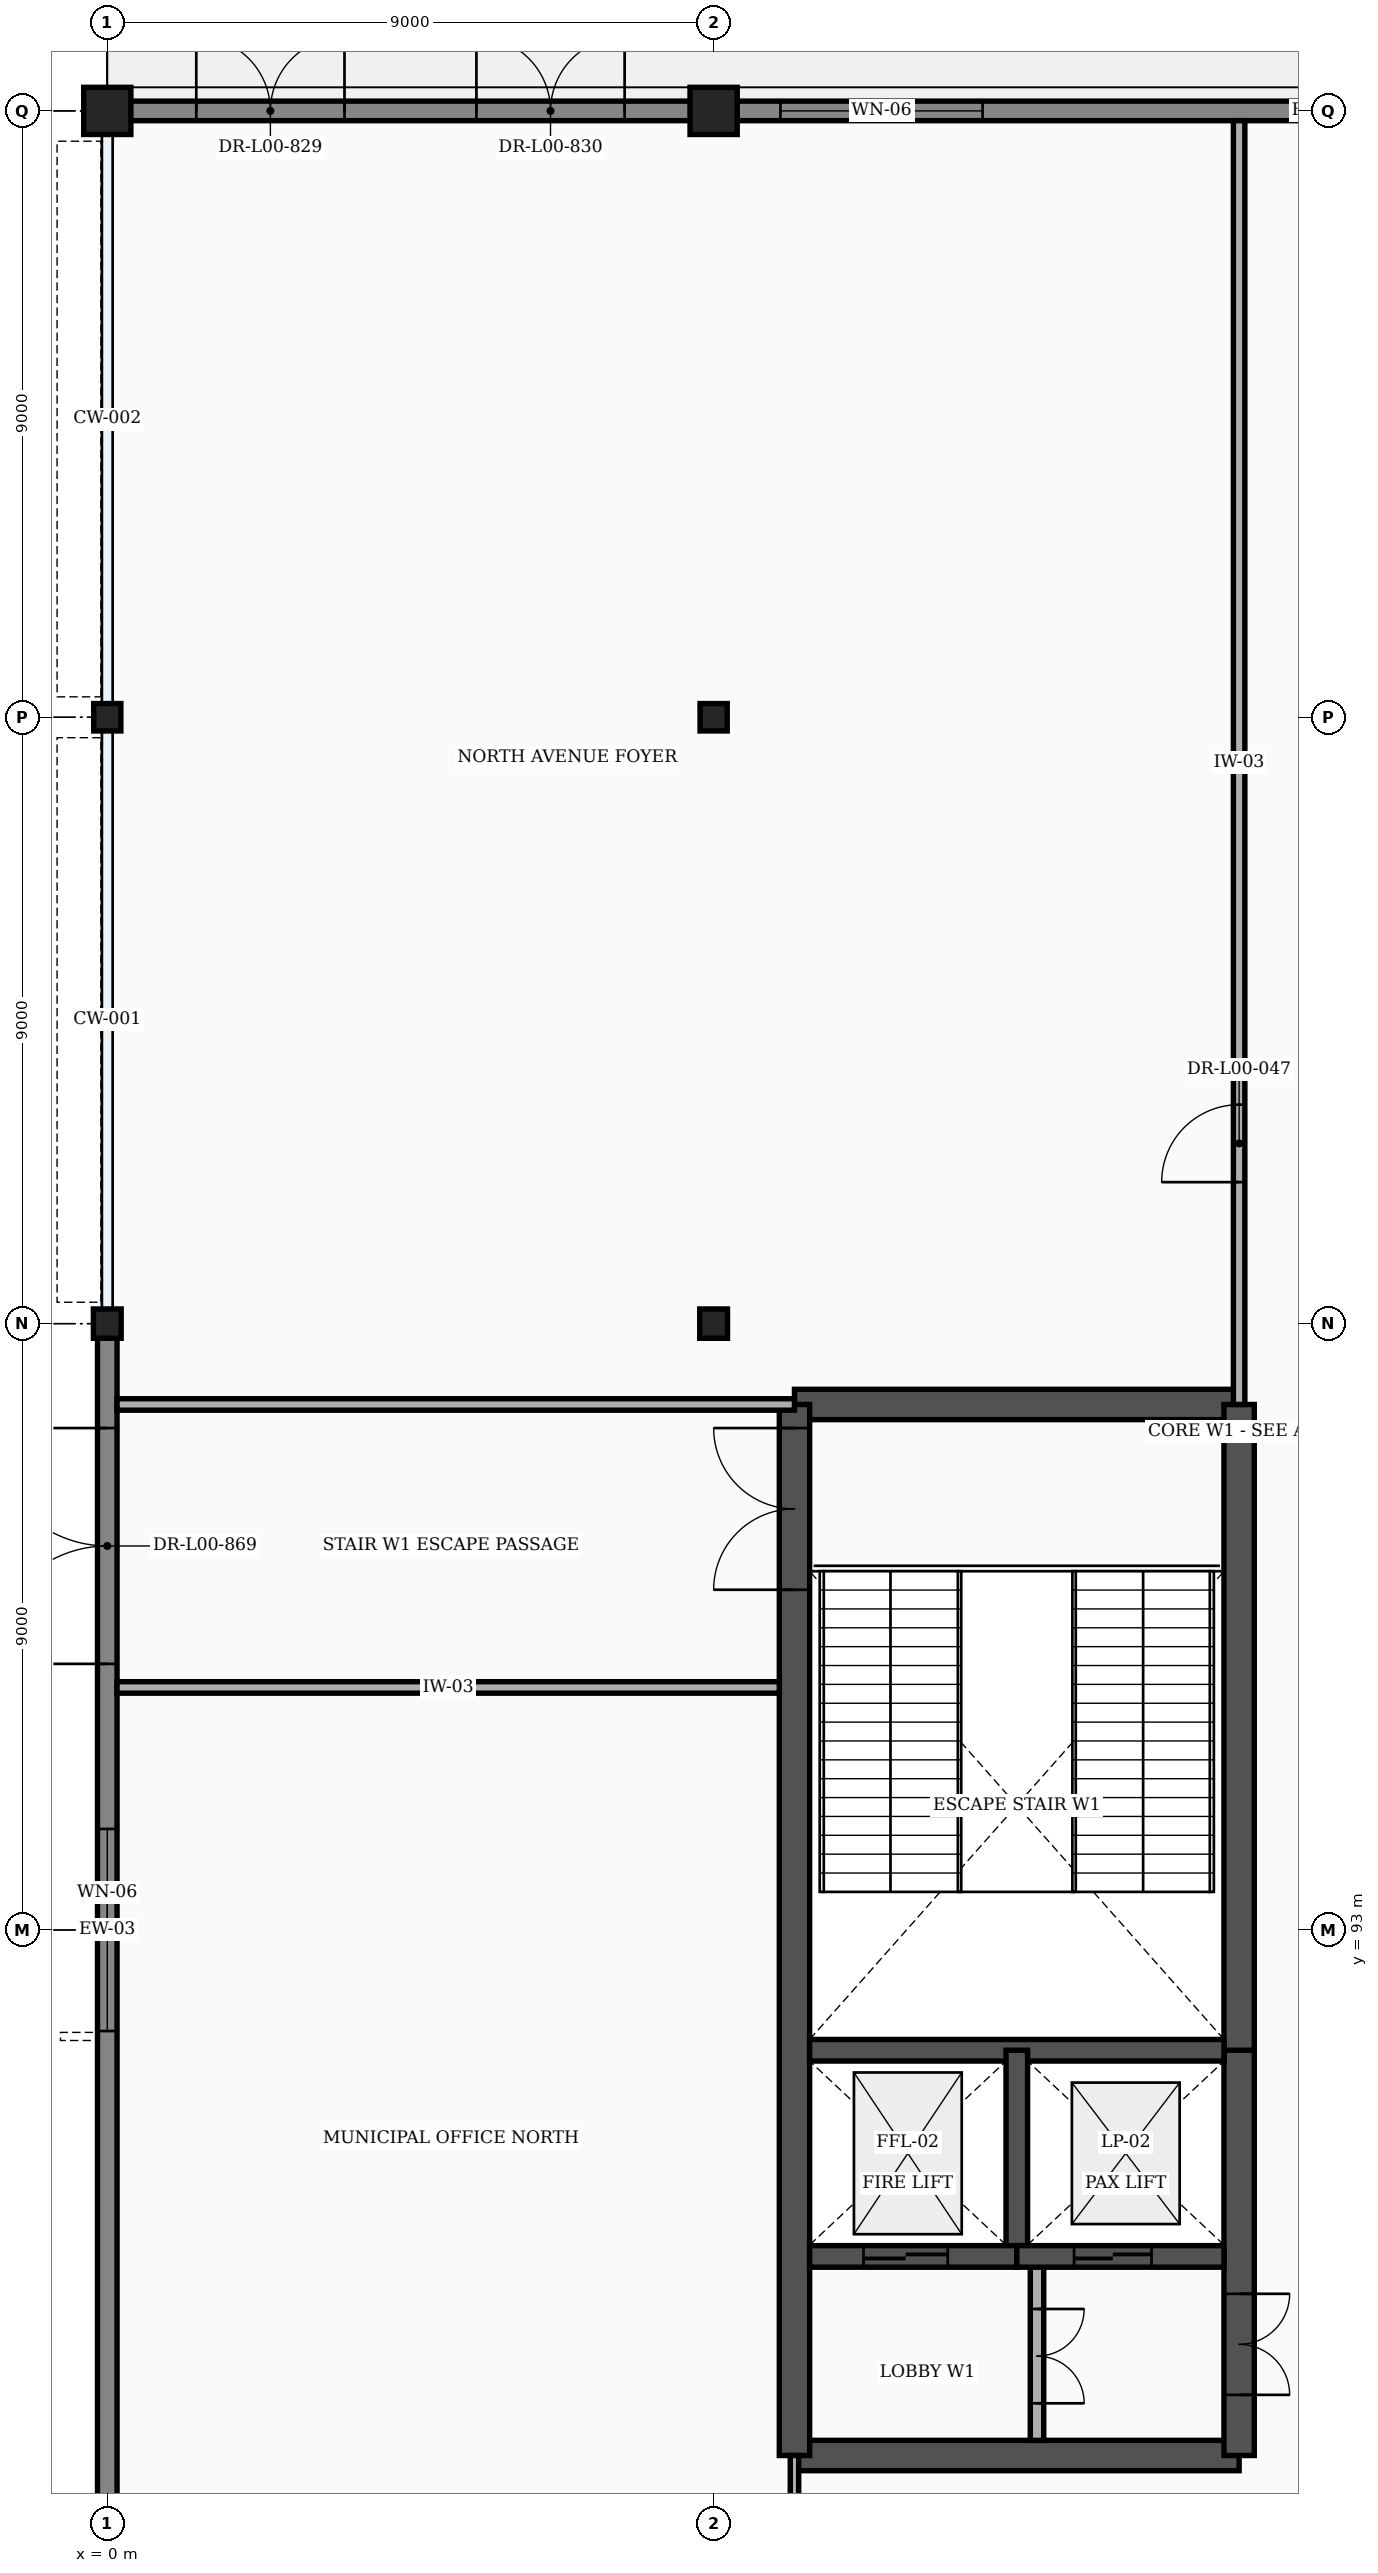
"""IFC4 building model, lengths in metres.
Left out: names, types, materials, properties, quantities, classifications, styles, units other than length and angle.
Written with IfcOpenShell. Run it as: python <this file> out.ifc"""

import sys

from ifc_helpers import new_model, si_unit, direction, frame, frame_2d, origin, origin_2d, place, context, subcontext, project, spatial, rectangle, i_section, extrude, element, fill, save


model = new_model("IFC4")
c1 = context("Model", 3, precision=1e-05, world=origin(), true_north=direction((0.0, 1.0)))
c2 = subcontext(c1, "Body", "Model", "MODEL_VIEW")
j1 = project(units=[si_unit("LENGTHUNIT", "METRE"), si_unit("PLANEANGLEUNIT", "RADIAN")], contexts=[c1])
p1 = place(None, origin())
s1 = spatial("IfcSite", under=j1, at=p1, CompositionType="ELEMENT")
p2 = place(p1, origin())
s2 = spatial("IfcBuilding", under=s1, at=p2, CompositionType="ELEMENT")
p3 = place(p2, origin())
s3 = spatial("IfcBuildingStorey", under=s2, at=p3, CompositionType="ELEMENT", Elevation=0.0)
p4 = place(p3, frame((0.0, 102.0, 0.0), z_axis=(0.0, 0.0, 1.0), x_axis=(1.0, 0.0, 0.0)))
e1 = element("IfcColumn", 1, at=p4, inside=s3, PredefinedType="COLUMN", context=c2, shape_type="SweptSolid", body=[
    extrude(i_section(OverallWidth=0.412, OverallDepth=0.435, WebThickness=0.036, FlangeThickness=0.058, at=origin_2d()), origin(), (0.0, 0.0, 1.0), 6.0),
])
p5 = place(p3, frame((0.0, 111.0, 0.0), z_axis=(0.0, 0.0, 1.0), x_axis=(1.0, 0.0, 0.0)))
e2 = element("IfcColumn", 2, at=p5, inside=s3, PredefinedType="COLUMN", context=c2, shape_type="SweptSolid", body=[
    extrude(i_section(OverallWidth=0.403, OverallDepth=0.406, WebThickness=0.027, FlangeThickness=0.043, at=origin_2d()), origin(), (0.0, 0.0, 1.0), 6.0),
])
p6 = place(p3, frame((0.0, 120.0, 0.0), z_axis=(0.0, 0.0, 1.0), x_axis=(1.0, 0.0, 0.0)))
e3 = element("IfcColumn", 3, at=p6, inside=s3, PredefinedType="COLUMN", context=c2, shape_type="SweptSolid", body=[
    extrude(rectangle(XDim=0.7, YDim=0.7, at=origin_2d()), origin(), (0.0, 0.0, 1.0), 6.0),
])
p7 = place(p3, frame((9.0, 102.0, 0.0), z_axis=(0.0, 0.0, 1.0), x_axis=(1.0, 0.0, 0.0)))
e4 = element("IfcColumn", 4, at=p7, inside=s3, PredefinedType="COLUMN", context=c2, shape_type="SweptSolid", body=[
    extrude(i_section(OverallWidth=0.412, OverallDepth=0.435, WebThickness=0.036, FlangeThickness=0.058, at=origin_2d()), origin(), (0.0, 0.0, 1.0), 6.0),
])
p8 = place(p3, frame((9.0, 111.0, 0.0), z_axis=(0.0, 0.0, 1.0), x_axis=(1.0, 0.0, 0.0)))
e5 = element("IfcColumn", 5, at=p8, inside=s3, PredefinedType="COLUMN", context=c2, shape_type="SweptSolid", body=[
    extrude(i_section(OverallWidth=0.403, OverallDepth=0.406, WebThickness=0.027, FlangeThickness=0.043, at=origin_2d()), origin(), (0.0, 0.0, 1.0), 6.0),
])
p9 = place(p3, frame((9.0, 120.0, 0.0), z_axis=(0.0, 0.0, 1.0), x_axis=(1.0, 0.0, 0.0)))
e6 = element("IfcColumn", 6, at=p9, inside=s3, PredefinedType="COLUMN", context=c2, shape_type="SweptSolid", body=[
    extrude(rectangle(XDim=0.7, YDim=0.7, at=origin_2d()), origin(), (0.0, 0.0, 1.0), 6.0),
])
p10 = place(p3, frame((0.342, 120.0, 0.0), z_axis=(0.0, 0.0, 1.0), x_axis=(1.0, 0.0, 0.0)))
e7 = element("IfcWall", 7, at=p10, inside=s3, PredefinedType="STANDARD", context=c2, shape_type="SweptSolid", body=[
    extrude(rectangle(XDim=8.316, YDim=0.29, at=frame_2d((4.158, 0.0))), origin(), (0.0, 0.0, 1.0), 5.138),
])
p11 = place(p10, frame((0.979, 0.0, 0.0)))
e8 = element("IfcOpeningElement", 8, at=p11, cuts=e7, PredefinedType="OPENING", context=c2, shape_type="SweptSolid", body=[
    extrude(rectangle(XDim=2.2, YDim=2.4, at=frame_2d((1.1, 1.2))), frame((0.0, 0.157, 0.0), z_axis=(0.0, -1.0, 0.0), x_axis=(1.0, 0.0, 0.0)), (0.0, 0.0, 1.0), 0.314),
])
p12 = place(p10, frame((5.137, 0.0, 0.0)))
e9 = element("IfcOpeningElement", 9, at=p12, cuts=e7, PredefinedType="OPENING", context=c2, shape_type="SweptSolid", body=[
    extrude(rectangle(XDim=2.2, YDim=2.4, at=frame_2d((1.1, 1.2))), frame((0.0, 0.157, 0.0), z_axis=(0.0, -1.0, 0.0), x_axis=(1.0, 0.0, 0.0)), (0.0, 0.0, 1.0), 0.314),
])
p13 = place(p3, frame((9.342, 120.0, 0.0), z_axis=(0.0, 0.0, 1.0), x_axis=(1.0, 0.0, 0.0)))
e10 = element("IfcWall", 10, at=p13, inside=s3, PredefinedType="STANDARD", context=c2, shape_type="SweptSolid", body=[
    extrude(rectangle(XDim=17.316, YDim=0.29, at=frame_2d((8.658, 0.0))), origin(), (0.0, 0.0, 1.0), 4.988),
])
p14 = place(p13, frame((10.508, 0.0, 0.0)))
e11 = element("IfcOpeningElement", 11, at=p14, cuts=e10, PredefinedType="OPENING", context=c2, shape_type="SweptSolid", body=[
    extrude(rectangle(XDim=3.5, YDim=2.4, at=frame_2d((1.75, 1.2))), frame((0.0, 0.157, 0.0), z_axis=(0.0, -1.0, 0.0), x_axis=(1.0, 0.0, 0.0)), (0.0, 0.0, 1.0), 0.314),
])
p15 = place(p13, frame((0.65, 0.0, 0.85)))
e12 = element("IfcOpeningElement", 12, at=p15, cuts=e10, PredefinedType="OPENING", context=c2, shape_type="SweptSolid", body=[
    extrude(rectangle(XDim=3.0, YDim=2.6, at=frame_2d((1.5, 1.3))), frame((0.0, 0.157, 0.0), z_axis=(0.0, -1.0, 0.0), x_axis=(1.0, 0.0, 0.0)), (0.0, 0.0, 1.0), 0.314),
])
p16 = place(p3, frame((0.0, 84.198, 0.0), z_axis=(0.0, 0.0, 1.0), x_axis=(0.0, 1.0, 0.0)))
e13 = element("IfcWall", 13, at=p16, inside=s3, PredefinedType="STANDARD", context=c2, shape_type="SweptSolid", body=[
    extrude(rectangle(XDim=17.603, YDim=0.29, at=frame_2d((8.802, 0.0))), origin(), (0.0, 0.0, 1.0), 5.066),
])
p17 = place(p16, frame((12.751, 0.0, 0.0)))
e14 = element("IfcOpeningElement", 14, at=p17, cuts=e13, PredefinedType="OPENING", context=c2, shape_type="SweptSolid", body=[
    extrude(rectangle(XDim=3.5, YDim=2.4, at=frame_2d((1.75, 1.2))), frame((0.0, 0.157, 0.0), z_axis=(0.0, -1.0, 0.0), x_axis=(1.0, 0.0, 0.0)), (0.0, 0.0, 1.0), 0.314),
])
p18 = place(p16, frame((7.302, 0.0, 0.85)))
e15 = element("IfcOpeningElement", 15, at=p18, cuts=e13, PredefinedType="OPENING", context=c2, shape_type="SweptSolid", body=[
    extrude(rectangle(XDim=3.0, YDim=2.6, at=frame_2d((1.5, 1.3))), frame((0.0, 0.157, 0.0), z_axis=(0.0, -1.0, 0.0), x_axis=(1.0, 0.0, 0.0)), (0.0, 0.0, 1.0), 0.314),
])
for number, where, z_axis, x_axis in (
    (16, (10.2, 85.2, 0.0), (0.0, 0.0, 1.0), (1.0, 0.0, 0.0)),
    (17, (10.2, 100.8, 0.0), (0.0, 0.0, 1.0), (1.0, 0.0, 0.0)),
):
    element("IfcWall", number, at=place(p3, frame(where, z_axis=z_axis, x_axis=x_axis)), inside=s3, PredefinedType="SHEAR", context=c2, shape_type="SweptSolid", body=[
        extrude(rectangle(XDim=6.6, YDim=0.45, at=frame_2d((3.3, 0.0))), origin(), (0.0, 0.0, 1.0), 5.75),
    ])
p19 = place(p3, frame((10.2, 85.2, 0.0), z_axis=(0.0, 0.0, 1.0), x_axis=(0.0, 1.0, 0.0)))
e18 = element("IfcWall", 18, at=p19, inside=s3, PredefinedType="SHEAR", context=c2, shape_type="SweptSolid", body=[
    extrude(rectangle(XDim=15.6, YDim=0.45, at=frame_2d((7.8, 0.0))), origin(), (0.0, 0.0, 1.0), 5.75),
])
p20 = place(p19, frame((12.85, 0.0, 0.0)))
e19 = element("IfcOpeningElement", 19, at=p20, cuts=e18, PredefinedType="OPENING", context=c2, shape_type="SweptSolid", body=[
    extrude(rectangle(XDim=2.4, YDim=2.25, at=frame_2d((1.2, 1.125))), frame((0.0, 0.237, 0.0), z_axis=(0.0, -1.0, 0.0), x_axis=(1.0, 0.0, 0.0)), (0.0, 0.0, 1.0), 0.474),
])
p21 = place(p3, frame((16.8, 85.2, 0.0), z_axis=(0.0, 0.0, 1.0), x_axis=(0.0, 1.0, 0.0)))
e20 = element("IfcWall", 20, at=p21, inside=s3, PredefinedType="SHEAR", context=c2, shape_type="SweptSolid", body=[
    extrude(rectangle(XDim=6.015, YDim=0.45, at=frame_2d((3.008, 0.0))), origin(), (0.0, 0.0, 1.0), 5.75),
])
p22 = place(p21, frame((0.9, 0.0, 0.0)))
e21 = element("IfcOpeningElement", 21, at=p22, cuts=e20, PredefinedType="OPENING", context=c2, shape_type="SweptSolid", body=[
    extrude(rectangle(XDim=1.5, YDim=2.2, at=frame_2d((0.75, 1.1))), frame((0.0, 0.237, 0.0), z_axis=(0.0, -1.0, 0.0), x_axis=(1.0, 0.0, 0.0)), (0.0, 0.0, 1.0), 0.474),
])
p23 = place(p3, frame((16.8, 91.215, 0.0), z_axis=(0.0, 0.0, 1.0), x_axis=(0.0, 1.0, 0.0)))
e22 = element("IfcWall", 22, at=p23, inside=s3, PredefinedType="SHEAR", context=c2, shape_type="SweptSolid", body=[
    extrude(rectangle(XDim=9.585, YDim=0.45, at=frame_2d((4.792, 0.0))), origin(), (0.0, 0.0, 1.0), 5.75),
])
p24 = place(p3, frame((10.425, 91.215, 0.0), z_axis=(0.0, 0.0, 1.0), x_axis=(1.0, 0.0, 0.0)))
e23 = element("IfcWall", 23, at=p24, inside=s3, PredefinedType="SHEAR", context=c2, shape_type="SweptSolid", body=[
    extrude(rectangle(XDim=6.15, YDim=0.32, at=frame_2d((3.075, 0.0))), origin(), (0.0, 0.0, 1.0), 5.75),
])
p25 = place(p3, frame((13.5, 88.155, 0.0), z_axis=(0.0, 0.0, 1.0), x_axis=(0.0, 1.0, 0.0)))
e24 = element("IfcWall", 24, at=p25, inside=s3, PredefinedType="SHEAR", context=c2, shape_type="SweptSolid", body=[
    extrude(rectangle(XDim=3.06, YDim=0.32, at=frame_2d((1.53, 0.0))), origin(), (0.0, 0.0, 1.0), 5.75),
])
p26 = place(p3, frame((13.8, 85.425, 0.0), z_axis=(0.0, 0.0, 1.0), x_axis=(0.0, 1.0, 0.0)))
e25 = element("IfcWall", 25, at=p26, inside=s3, PredefinedType="PARTITIONING", context=c2, shape_type="SweptSolid", body=[
    extrude(rectangle(XDim=2.73, YDim=0.2, at=frame_2d((1.365, 0.0))), origin(), (0.0, 0.0, 1.0), 5.75),
])
p27 = place(p26, frame((0.55, 0.0, 0.0)))
e26 = element("IfcOpeningElement", 26, at=p27, cuts=e25, PredefinedType="OPENING", context=c2, shape_type="SweptSolid", body=[
    extrude(rectangle(XDim=1.4, YDim=2.25, at=frame_2d((0.7, 1.125))), frame((0.0, 0.112, 0.0), z_axis=(0.0, -1.0, 0.0), x_axis=(1.0, 0.0, 0.0)), (0.0, 0.0, 1.0), 0.224),
])
p28 = place(p3, frame((10.425, 88.155, 0.0), z_axis=(0.0, 0.0, 1.0), x_axis=(1.0, 0.0, 0.0)))
e27 = element("IfcWall", 27, at=p28, inside=s3, PredefinedType="SHEAR", context=c2, shape_type="SweptSolid", body=[
    extrude(rectangle(XDim=3.075, YDim=0.32, at=frame_2d((1.538, 0.0))), origin(), (0.0, 0.0, 1.0), 5.75),
])
p29 = place(p28, frame((0.8, 0.0, 0.0)))
e28 = element("IfcOpeningElement", 28, at=p29, cuts=e27, PredefinedType="OPENING", context=c2, shape_type="SweptSolid", body=[
    extrude(rectangle(XDim=1.25, YDim=2.25, at=frame_2d((0.625, 1.125))), frame((0.0, 0.172, 0.0), z_axis=(0.0, -1.0, 0.0), x_axis=(1.0, 0.0, 0.0)), (0.0, 0.0, 1.0), 0.344),
])
p30 = place(p3, frame((13.5, 88.155, 0.0), z_axis=(0.0, 0.0, 1.0), x_axis=(1.0, 0.0, 0.0)))
e29 = element("IfcWall", 29, at=p30, inside=s3, PredefinedType="SHEAR", context=c2, shape_type="SweptSolid", body=[
    extrude(rectangle(XDim=3.075, YDim=0.32, at=frame_2d((1.538, 0.0))), origin(), (0.0, 0.0, 1.0), 5.75),
])
p31 = place(p30, frame((0.85, 0.0, 0.0)))
e30 = element("IfcOpeningElement", 30, at=p31, cuts=e29, PredefinedType="OPENING", context=c2, shape_type="SweptSolid", body=[
    extrude(rectangle(XDim=1.15, YDim=2.2, at=frame_2d((0.575, 1.1))), frame((0.0, 0.172, 0.0), z_axis=(0.0, -1.0, 0.0), x_axis=(1.0, 0.0, 0.0)), (0.0, 0.0, 1.0), 0.344),
])
p32 = place(p3, frame((10.2, 83.2, 0.0), z_axis=(0.0, 0.0, 1.0), x_axis=(0.0, 1.0, 0.0)))
e31 = element("IfcWall", 31, at=p32, inside=s3, PredefinedType="PARTITIONING", context=c2, shape_type="SweptSolid", body=[
    extrude(rectangle(XDim=2.0, YDim=0.125, at=frame_2d((1.0, 0.0))), origin(), (0.0, 0.0, 1.0), 5.75),
])
p33 = place(p3, frame((0.145, 100.8, 0.0), z_axis=(0.0, 0.0, 1.0), x_axis=(1.0, 0.0, 0.0)))
e32 = element("IfcWall", 32, at=p33, inside=s3, PredefinedType="PARTITIONING", context=c2, shape_type="SweptSolid", body=[
    extrude(rectangle(XDim=10.055, YDim=0.17, at=frame_2d((5.027, 0.0))), origin(), (0.0, 0.0, 1.0), 5.75),
])
p34 = place(p3, frame((16.8, 100.8, 0.0), z_axis=(0.0, 0.0, 1.0), x_axis=(0.0, 1.0, 0.0)))
e33 = element("IfcWall", 33, at=p34, inside=s3, PredefinedType="PARTITIONING", context=c2, shape_type="SweptSolid", body=[
    extrude(rectangle(XDim=19.055, YDim=0.17, at=frame_2d((9.527, 0.0))), origin(), (0.0, 0.0, 1.0), 5.75),
])
p35 = place(p34, frame((3.3, 0.0, 0.0)))
e34 = element("IfcOpeningElement", 34, at=p35, cuts=e33, PredefinedType="OPENING", context=c2, shape_type="SweptSolid", body=[
    extrude(rectangle(XDim=1.15, YDim=2.15, at=frame_2d((0.575, 1.075))), frame((0.0, 0.097, 0.0), z_axis=(0.0, -1.0, 0.0), x_axis=(1.0, 0.0, 0.0)), (0.0, 0.0, 1.0), 0.194),
])
p36 = place(p3, frame((0.145, 96.6, 0.0), z_axis=(0.0, 0.0, 1.0), x_axis=(1.0, 0.0, 0.0)))
e35 = element("IfcWall", 35, at=p36, inside=s3, PredefinedType="PARTITIONING", context=c2, shape_type="SweptSolid", body=[
    extrude(rectangle(XDim=9.83, YDim=0.17, at=frame_2d((4.915, 0.0))), origin(), (0.0, 0.0, 1.0), 5.75),
])
p37 = place(p11, origin())
e36 = element("IfcDoor", 36, at=p37, inside=s3, OperationType="DOUBLE_DOOR_SINGLE_SWING", PredefinedType="DOOR", context=c2, shape_type="SweptSolid", body=[
    extrude(rectangle(XDim=2.2, YDim=2.4, at=frame_2d((1.1, 1.2))), frame((0.0, 0.025, 0.0), z_axis=(0.0, -1.0, 0.0), x_axis=(1.0, 0.0, 0.0)), (0.0, 0.0, 1.0), 0.05),
])
fill(e8, e36)
p38 = place(p12, origin())
e37 = element("IfcDoor", 37, at=p38, inside=s3, OperationType="DOUBLE_DOOR_SINGLE_SWING", PredefinedType="DOOR", context=c2, shape_type="SweptSolid", body=[
    extrude(rectangle(XDim=2.2, YDim=2.4, at=frame_2d((1.1, 1.2))), frame((0.0, 0.025, 0.0), z_axis=(0.0, -1.0, 0.0), x_axis=(1.0, 0.0, 0.0)), (0.0, 0.0, 1.0), 0.05),
])
fill(e9, e37)
p39 = place(p15, origin())
e38 = element("IfcWindow", 38, at=p39, inside=s3, PartitioningType="SINGLE_PANEL", PredefinedType="WINDOW", context=c2, shape_type="SweptSolid", body=[
    extrude(rectangle(XDim=3.0, YDim=2.6, at=frame_2d((1.5, 1.3))), frame((0.0, 0.03, 0.0), z_axis=(0.0, -1.0, 0.0), x_axis=(1.0, 0.0, 0.0)), (0.0, 0.0, 1.0), 0.06),
])
fill(e12, e38)
p40 = place(p17, origin())
e39 = element("IfcDoor", 39, at=p40, inside=s3, OperationType="DOUBLE_DOOR_SINGLE_SWING", PredefinedType="DOOR", context=c2, shape_type="SweptSolid", body=[
    extrude(rectangle(XDim=3.5, YDim=2.4, at=frame_2d((1.75, 1.2))), frame((0.0, 0.025, 0.0), z_axis=(0.0, -1.0, 0.0), x_axis=(1.0, 0.0, 0.0)), (0.0, 0.0, 1.0), 0.05),
])
fill(e14, e39)
p41 = place(p18, origin())
e40 = element("IfcWindow", 40, at=p41, inside=s3, PartitioningType="SINGLE_PANEL", PredefinedType="WINDOW", context=c2, shape_type="SweptSolid", body=[
    extrude(rectangle(XDim=3.0, YDim=2.6, at=frame_2d((1.5, 1.3))), frame((0.0, 0.03, 0.0), z_axis=(0.0, -1.0, 0.0), x_axis=(1.0, 0.0, 0.0)), (0.0, 0.0, 1.0), 0.06),
])
fill(e15, e40)
p42 = place(p22, frame((1.5, 0.0, 0.0), z_axis=(0.0, 0.0, 1.0), x_axis=(-1.0, 0.0, 0.0)))
e41 = element("IfcDoor", 41, at=p42, inside=s3, OperationType="DOUBLE_DOOR_SINGLE_SWING", PredefinedType="DOOR", context=c2, shape_type="SweptSolid", body=[
    extrude(rectangle(XDim=1.5, YDim=2.2, at=frame_2d((0.75, 1.1))), frame((0.0, 0.025, 0.0), z_axis=(0.0, -1.0, 0.0), x_axis=(1.0, 0.0, 0.0)), (0.0, 0.0, 1.0), 0.05),
])
fill(e21, e41)
p43 = place(p20, origin())
e42 = element("IfcDoor", 42, at=p43, inside=s3, OperationType="DOUBLE_DOOR_SINGLE_SWING", PredefinedType="DOOR", context=c2, shape_type="SweptSolid", body=[
    extrude(rectangle(XDim=2.4, YDim=2.25, at=frame_2d((1.2, 1.125))), frame((0.0, 0.025, 0.0), z_axis=(0.0, -1.0, 0.0), x_axis=(1.0, 0.0, 0.0)), (0.0, 0.0, 1.0), 0.05),
])
fill(e19, e42)
p44 = place(p27, frame((1.4, 0.0, 0.0), z_axis=(0.0, 0.0, 1.0), x_axis=(-1.0, 0.0, 0.0)))
e43 = element("IfcDoor", 43, at=p44, inside=s3, OperationType="DOUBLE_DOOR_SINGLE_SWING", PredefinedType="DOOR", context=c2, shape_type="SweptSolid", body=[
    extrude(rectangle(XDim=1.4, YDim=2.25, at=frame_2d((0.7, 1.125))), frame((0.0, 0.025, 0.0), z_axis=(0.0, -1.0, 0.0), x_axis=(1.0, 0.0, 0.0)), (0.0, 0.0, 1.0), 0.05),
])
fill(e26, e43)
p45 = place(p29, origin())
e44 = element("IfcDoor", 44, at=p45, inside=s3, OperationType="DOUBLE_DOOR_SLIDING", PredefinedType="DOOR", context=c2, shape_type="SweptSolid", body=[
    extrude(rectangle(XDim=1.25, YDim=2.25, at=frame_2d((0.625, 1.125))), frame((0.0, 0.025, 0.0), z_axis=(0.0, -1.0, 0.0), x_axis=(1.0, 0.0, 0.0)), (0.0, 0.0, 1.0), 0.05),
])
fill(e28, e44)
p46 = place(p31, origin())
e45 = element("IfcDoor", 45, at=p46, inside=s3, OperationType="DOUBLE_DOOR_SLIDING", PredefinedType="DOOR", context=c2, shape_type="SweptSolid", body=[
    extrude(rectangle(XDim=1.15, YDim=2.2, at=frame_2d((0.575, 1.1))), frame((0.0, 0.025, 0.0), z_axis=(0.0, -1.0, 0.0), x_axis=(1.0, 0.0, 0.0)), (0.0, 0.0, 1.0), 0.05),
])
fill(e30, e45)
p47 = place(p35, origin())
e46 = element("IfcDoor", 46, at=p47, inside=s3, OperationType="SINGLE_SWING_LEFT", PredefinedType="DOOR", context=c2, shape_type="SweptSolid", body=[
    extrude(rectangle(XDim=1.15, YDim=2.15, at=frame_2d((0.575, 1.075))), frame((0.0, 0.025, 0.0), z_axis=(0.0, -1.0, 0.0), x_axis=(1.0, 0.0, 0.0)), (0.0, 0.0, 1.0), 0.05),
])
fill(e34, e46)
save(model, sys.argv[1])
